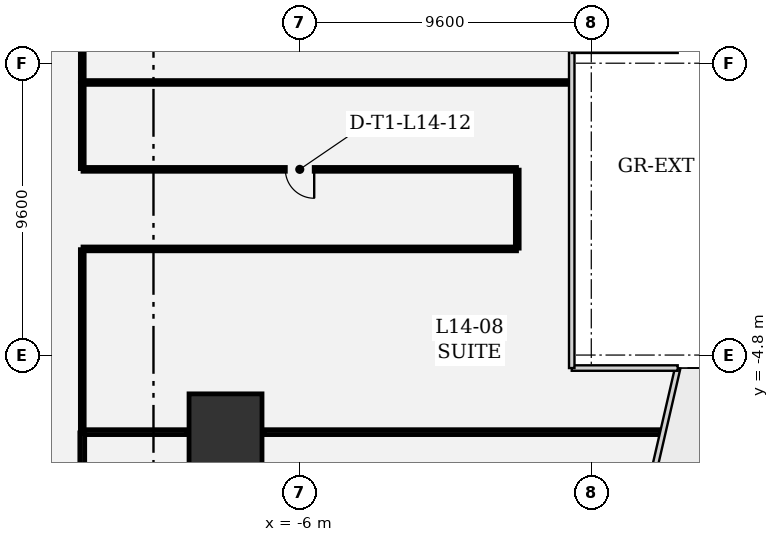
"""IFC4 building model, lengths in metres.
Left out: names, types, materials, properties, quantities, classifications, styles, units other than length and angle.
Written with IfcOpenShell. Run it as: python <this file> out.ifc"""

import sys

from ifc_helpers import new_model, si_unit, direction, frame, frame_2d, origin, origin_2d, place, context, subcontext, project, spatial, rectangle, extrude, element, fill, save


model = new_model("IFC4")
c1 = context("Model", 3, precision=1e-05, world=origin(), true_north=direction((0.0, 1.0)))
c2 = subcontext(c1, "Body", "Model", "MODEL_VIEW")
j1 = project(units=[si_unit("LENGTHUNIT", "METRE"), si_unit("PLANEANGLEUNIT", "RADIAN")], contexts=[c1])
p1 = place(None, origin())
s1 = spatial("IfcSite", under=j1, at=p1, CompositionType="ELEMENT")
p2 = place(p1, origin())
s2 = spatial("IfcBuilding", under=s1, at=p2, CompositionType="ELEMENT")
p3 = place(p2, frame((0.0, 0.0, 66.0)))
s3 = spatial("IfcBuildingStorey", under=s2, at=p3, CompositionType="ELEMENT", Elevation=66.0)
p4 = place(p3, frame((-8.43, -7.276, 0.0), z_axis=(0.0, 0.0, 1.0), x_axis=(1.0, 0.0, 0.0)))
e1 = element("IfcColumn", 1, at=p4, inside=s3, PredefinedType="COLUMN", context=c2, shape_type="SweptSolid", body=[
    extrude(rectangle(XDim=2.4, YDim=2.4, at=origin_2d()), origin(), (0.0, 0.0, 1.0), 4.2),
])
p5 = place(p3, frame((5.876, -7.336, 0.0), z_axis=(0.0, 0.0, 1.0), x_axis=(-1.0, 0.0, 0.0)))
e2 = element("IfcWall", 2, at=p5, inside=s3, PredefinedType="PARTITIONING", context=c2, shape_type="SweptSolid", body=[
    extrude(rectangle(XDim=13.041, YDim=0.16, at=frame_2d((6.521, 0.0))), origin(), (0.0, 0.0, 1.0), 3.92),
])
p6 = place(p3, frame((-9.695, -7.336, 0.0), z_axis=(0.0, 0.0, 1.0), x_axis=(-1.0, 0.0, 0.0)))
e3 = element("IfcWall", 3, at=p6, inside=s3, PredefinedType="PARTITIONING", context=c2, shape_type="SweptSolid", body=[
    extrude(rectangle(XDim=3.422, YDim=0.16, at=frame_2d((1.711, 0.0))), origin(), (0.0, 0.0, 1.0), 3.92),
])
p7 = place(p3, frame((-13.142, -7.361, 0.0), z_axis=(0.0, 0.0, 1.0), x_axis=(0.0, -1.0, 0.0)))
e4 = element("IfcWall", 4, at=p7, inside=s3, PredefinedType="PARTITIONING", context=c2, shape_type="SweptSolid", body=[
    extrude(rectangle(XDim=3.597, YDim=0.16, at=frame_2d((1.799, 0.0))), origin(), (0.0, 0.0, 1.0), 3.92),
])
p8 = place(p7, frame((1.249, 0.0, 0.0)))
e5 = element("IfcOpeningElement", 5, at=p8, cuts=e4, PredefinedType="OPENING", context=c2, shape_type="SweptSolid", body=[
    extrude(rectangle(XDim=1.1, YDim=2.15, at=frame_2d((0.55, 1.075))), frame((0.0, 0.09, 0.0), z_axis=(0.0, -1.0, 0.0), x_axis=(1.0, 0.0, 0.0)), (0.0, 0.0, 1.0), 0.18),
])
p9 = place(p3, frame((2.878, 4.166, 0.0), z_axis=(0.0, 0.0, 1.0), x_axis=(-1.0, 0.0, 0.0)))
e6 = element("IfcWall", 6, at=p9, inside=s3, PredefinedType="PARTITIONING", context=c2, shape_type="SweptSolid", body=[
    extrude(rectangle(XDim=15.995, YDim=0.125, at=frame_2d((7.998, 0.0))), origin(), (0.0, 0.0, 1.0), 3.92),
])
p10 = place(p3, frame((-13.142, 4.141, 0.0), z_axis=(0.0, 0.0, 1.0), x_axis=(0.0, -1.0, 0.0)))
e7 = element("IfcWall", 7, at=p10, inside=s3, PredefinedType="PARTITIONING", context=c2, shape_type="SweptSolid", body=[
    extrude(rectangle(XDim=2.808, YDim=0.125, at=frame_2d((1.404, 0.0))), origin(), (0.0, 0.0, 1.0), 3.92),
])
p11 = place(p3, frame((1.14, 1.308, 0.0), z_axis=(0.0, 0.0, 1.0), x_axis=(-1.0, 0.0, 0.0)))
e8 = element("IfcWall", 8, at=p11, inside=s3, PredefinedType="PARTITIONING", context=c2, shape_type="SweptSolid", body=[
    extrude(rectangle(XDim=14.258, YDim=0.125, at=frame_2d((7.129, 0.0))), origin(), (0.0, 0.0, 1.0), 3.92),
])
p12 = place(p11, frame((6.654, 0.0, 0.0)))
e9 = element("IfcOpeningElement", 9, at=p12, cuts=e8, PredefinedType="OPENING", context=c2, shape_type="SweptSolid", body=[
    extrude(rectangle(XDim=0.95, YDim=2.15, at=frame_2d((0.475, 1.075))), frame((0.0, 0.073, 0.0), z_axis=(0.0, -1.0, 0.0), x_axis=(1.0, 0.0, 0.0)), (0.0, 0.0, 1.0), 0.145),
])
p13 = place(p3, frame((1.166, -1.283, 0.0), z_axis=(0.0, 0.0, 1.0), x_axis=(0.0, 1.0, 0.0)))
e10 = element("IfcWall", 10, at=p13, inside=s3, PredefinedType="PARTITIONING", context=c2, shape_type="SweptSolid", body=[
    extrude(rectangle(XDim=2.566, YDim=0.125, at=frame_2d((1.283, 0.0))), origin(), (0.0, 0.0, 1.0), 3.92),
])
p14 = place(p3, frame((1.14, -1.308, 0.0), z_axis=(0.0, 0.0, 1.0), x_axis=(-1.0, 0.0, 0.0)))
e11 = element("IfcWall", 11, at=p14, inside=s3, PredefinedType="PARTITIONING", context=c2, shape_type="SweptSolid", body=[
    extrude(rectangle(XDim=14.258, YDim=0.125, at=frame_2d((7.129, 0.0))), origin(), (0.0, 0.0, 1.0), 3.92),
])
p15 = place(p3, frame((-13.142, -1.333, 0.0), z_axis=(0.0, 0.0, 1.0), x_axis=(0.0, -1.0, 0.0)))
e12 = element("IfcWall", 12, at=p15, inside=s3, PredefinedType="PARTITIONING", context=c2, shape_type="SweptSolid", body=[
    extrude(rectangle(XDim=5.97, YDim=0.125, at=frame_2d((2.985, 0.0))), origin(), (0.0, 0.0, 1.0), 3.92),
])
p16 = place(p3, frame((-13.142, 10.758, 0.0), z_axis=(0.0, 0.0, 1.0), x_axis=(0.0, -1.0, 0.0)))
e13 = element("IfcWall", 13, at=p16, inside=s3, PredefinedType="PARTITIONING", context=c2, shape_type="SweptSolid", body=[
    extrude(rectangle(XDim=6.56, YDim=0.125, at=frame_2d((3.28, 0.0))), origin(), (0.0, 0.0, 1.0), 3.92),
])
p17 = place(p16, frame((2.805, 0.0, 0.0)))
e14 = element("IfcOpeningElement", 14, at=p17, cuts=e13, PredefinedType="OPENING", context=c2, shape_type="SweptSolid", body=[
    extrude(rectangle(XDim=0.95, YDim=2.15, at=frame_2d((0.475, 1.075))), frame((0.0, 0.073, 0.0), z_axis=(0.0, -1.0, 0.0), x_axis=(1.0, 0.0, 0.0)), (0.0, 0.0, 1.0), 0.145),
])
p18 = place(p12, origin())
e15 = element("IfcDoor", 15, at=p18, inside=s3, OperationType="SINGLE_SWING_LEFT", PredefinedType="DOOR", context=c2, shape_type="SweptSolid", body=[
    extrude(rectangle(XDim=0.95, YDim=2.15, at=frame_2d((0.475, 1.075))), frame((0.0, 0.025, 0.0), z_axis=(0.0, -1.0, 0.0), x_axis=(1.0, 0.0, 0.0)), (0.0, 0.0, 1.0), 0.05),
])
fill(e9, e15)
save(model, sys.argv[1])
